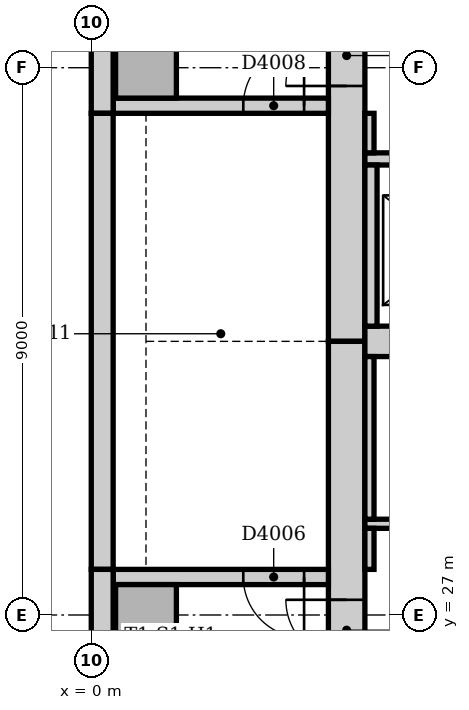
"""IFC4 building model, lengths in metres.
Left out: names, types, materials, properties, quantities, classifications, styles, units other than length and angle.
Written with IfcOpenShell. Run it as: python <this file> out.ifc"""

import sys

from ifc_helpers import new_model, si_unit, direction, frame, frame_2d, origin, origin_2d, place, context, subcontext, project, spatial, rectangle, extrude, element, fill, save


model = new_model("IFC4")
c1 = context("Model", 3, precision=1e-05, world=origin(), true_north=direction((0.0, 1.0)))
c2 = subcontext(c1, "Body", "Model", "MODEL_VIEW")
j1 = project(units=[si_unit("LENGTHUNIT", "METRE"), si_unit("PLANEANGLEUNIT", "RADIAN")], contexts=[c1])
p1 = place(None, origin())
s1 = spatial("IfcSite", under=j1, at=p1, CompositionType="ELEMENT")
p2 = place(p1, origin())
s2 = spatial("IfcBuilding", under=s1, at=p2, CompositionType="ELEMENT")
p3 = place(p2, frame((0.0, 0.0, 108.0)))
s3 = spatial("IfcBuildingStorey", under=s2, at=p3, CompositionType="ELEMENT", Elevation=108.0)
p4 = place(p3, frame((4.2, 42.0, 0.0), z_axis=(0.0, 0.0, 1.0), x_axis=(0.0, -1.0, 0.0)))
e1 = element("IfcWall", 1, at=p4, inside=s3, PredefinedType="SOLIDWALL", context=c2, shape_type="SweptSolid", body=[
    extrude(rectangle(XDim=10.5, YDim=0.6, at=frame_2d((5.25, 0.0))), origin(), (0.0, 0.0, 1.0), 4.0),
])
p5 = place(p4, frame((5.3, 0.0, 0.0)))
e2 = element("IfcOpeningElement", 2, at=p5, cuts=e1, PredefinedType="OPENING", context=c2, shape_type="SweptSolid", body=[
    extrude(rectangle(XDim=1.0, YDim=2.1, at=frame_2d((0.5, 1.05))), frame((0.0, 0.31, 0.0), z_axis=(0.0, -1.0, 0.0), x_axis=(1.0, 0.0, 0.0)), (0.0, 0.0, 1.0), 0.62),
])
p6 = place(p3, frame((4.2, 31.5, 0.0), z_axis=(0.0, 0.0, 1.0), x_axis=(0.0, -1.0, 0.0)))
e3 = element("IfcWall", 3, at=p6, inside=s3, PredefinedType="SOLIDWALL", context=c2, shape_type="SweptSolid", body=[
    extrude(rectangle(XDim=10.5, YDim=0.6, at=frame_2d((5.25, 0.0))), origin(), (0.0, 0.0, 1.0), 4.0),
])
p7 = place(p6, frame((4.25, 0.0, 0.0)))
e4 = element("IfcOpeningElement", 4, at=p7, cuts=e3, PredefinedType="OPENING", context=c2, shape_type="SweptSolid", body=[
    extrude(rectangle(XDim=1.0, YDim=2.1, at=frame_2d((0.5, 1.05))), frame((0.0, 0.31, 0.0), z_axis=(0.0, -1.0, 0.0), x_axis=(1.0, 0.0, 0.0)), (0.0, 0.0, 1.0), 0.62),
])
p8 = place(p3, frame((4.5, 31.5, 0.0), z_axis=(0.0, 0.0, 1.0), x_axis=(1.0, 0.0, 0.0)))
e5 = element("IfcWall", 5, at=p8, inside=s3, PredefinedType="SOLIDWALL", context=c2, shape_type="SweptSolid", body=[
    extrude(rectangle(XDim=18.0, YDim=0.5, at=frame_2d((9.0, 0.0))), origin(), (0.0, 0.0, 1.0), 4.0),
])
p9 = place(p3, frame((3.9, 27.625, 0.0), z_axis=(0.0, 0.0, 1.0), x_axis=(-1.0, 0.0, 0.0)))
e6 = element("IfcWall", 6, at=p9, inside=s3, PredefinedType="SOLIDWALL", context=c2, shape_type="SweptSolid", body=[
    extrude(rectangle(XDim=3.54, YDim=0.25, at=frame_2d((1.77, 0.0))), origin(), (0.0, 0.0, 1.0), 4.0),
])
p10 = place(p9, frame((0.4, 0.0, 0.0)))
e7 = element("IfcOpeningElement", 7, at=p10, cuts=e6, PredefinedType="OPENING", context=c2, shape_type="SweptSolid", body=[
    extrude(rectangle(XDim=1.0, YDim=2.1, at=frame_2d((0.5, 1.05))), frame((0.0, 0.135, 0.0), z_axis=(0.0, -1.0, 0.0), x_axis=(1.0, 0.0, 0.0)), (0.0, 0.0, 1.0), 0.27),
])
p11 = place(p3, frame((0.36, 35.375, 0.0), z_axis=(0.0, 0.0, 1.0), x_axis=(1.0, 0.0, 0.0)))
e8 = element("IfcWall", 8, at=p11, inside=s3, PredefinedType="SOLIDWALL", context=c2, shape_type="SweptSolid", body=[
    extrude(rectangle(XDim=3.54, YDim=0.25, at=frame_2d((1.77, 0.0))), origin(), (0.0, 0.0, 1.0), 4.0),
])
p12 = place(p11, frame((2.14, 0.0, 0.0)))
e9 = element("IfcOpeningElement", 9, at=p12, cuts=e8, PredefinedType="OPENING", context=c2, shape_type="SweptSolid", body=[
    extrude(rectangle(XDim=1.0, YDim=2.1, at=frame_2d((0.5, 1.05))), frame((0.0, 0.135, 0.0), z_axis=(0.0, -1.0, 0.0), x_axis=(1.0, 0.0, 0.0)), (0.0, 0.0, 1.0), 0.27),
])
for number, where, z_axis, x_axis in (
    (10, (0.9, 27.0, 0.0), (0.0, 0.0, 1.0), (1.0, 0.0, 0.0)),
    (11, (0.9, 36.0, 0.0), (0.0, 0.0, 1.0), (1.0, 0.0, 0.0)),
):
    element("IfcColumn", number, at=place(p3, frame(where, z_axis=z_axis, x_axis=x_axis)), inside=s3, PredefinedType="COLUMN", context=c2, shape_type="SweptSolid", body=[
        extrude(rectangle(XDim=1.0, YDim=1.0, at=origin_2d()), origin(), (0.0, 0.0, 1.0), 4.0),
    ])
p13 = place(p3, frame((0.18, 42.0, 0.0), z_axis=(0.0, 0.0, 1.0), x_axis=(0.0, -1.0, 0.0)))
e12 = element("IfcWall", 12, at=p13, inside=s3, PredefinedType="STANDARD", context=c2, shape_type="SweptSolid", body=[
    extrude(rectangle(XDim=6.75, YDim=0.36, at=frame_2d((3.375, 0.0))), origin(), (0.0, 0.0, 1.0), 3.85),
])
p14 = place(p3, frame((0.18, 35.25, 0.0), z_axis=(0.0, 0.0, 1.0), x_axis=(0.0, -1.0, 0.0)))
e13 = element("IfcWall", 13, at=p14, inside=s3, PredefinedType="STANDARD", context=c2, shape_type="SweptSolid", body=[
    extrude(rectangle(XDim=7.5, YDim=0.36, at=frame_2d((3.75, 0.0))), origin(), (0.0, 0.0, 1.0), 3.85),
])
p15 = place(p3, frame((0.18, 27.75, 0.0), z_axis=(0.0, 0.0, 1.0), x_axis=(0.0, -1.0, 0.0)))
e14 = element("IfcWall", 14, at=p15, inside=s3, PredefinedType="STANDARD", context=c2, shape_type="SweptSolid", body=[
    extrude(rectangle(XDim=6.75, YDim=0.36, at=frame_2d((3.375, 0.0))), origin(), (0.0, 0.0, 1.0), 3.85),
])
p16 = place(p3, frame((4.5, 34.5, 0.0), z_axis=(0.0, 0.0, 1.0), x_axis=(1.0, 0.0, 0.0)))
e15 = element("IfcWall", 15, at=p16, inside=s3, PredefinedType="PARTITIONING", context=c2, shape_type="SweptSolid", body=[
    extrude(rectangle(XDim=18.0, YDim=0.2, at=frame_2d((9.0, 0.0))), origin(), (0.0, 0.0, 1.0), 3.85),
])
p17 = place(p16, frame((0.95, 0.0, 0.0)))
e16 = element("IfcOpeningElement", 16, at=p17, cuts=e15, PredefinedType="OPENING", context=c2, shape_type="SweptSolid", body=[
    extrude(rectangle(XDim=1.1, YDim=2.1, at=frame_2d((0.55, 1.05))), frame((0.0, 0.11, 0.0), z_axis=(0.0, -1.0, 0.0), x_axis=(1.0, 0.0, 0.0)), (0.0, 0.0, 1.0), 0.22),
])
p18 = place(p16, frame((3.95, 0.0, 0.0)))
e17 = element("IfcOpeningElement", 17, at=p18, cuts=e15, PredefinedType="OPENING", context=c2, shape_type="SweptSolid", body=[
    extrude(rectangle(XDim=1.1, YDim=2.1, at=frame_2d((0.55, 1.05))), frame((0.0, 0.11, 0.0), z_axis=(0.0, -1.0, 0.0), x_axis=(1.0, 0.0, 0.0)), (0.0, 0.0, 1.0), 0.22),
])
p19 = place(p16, frame((12.95, 0.0, 0.0)))
e18 = element("IfcOpeningElement", 18, at=p19, cuts=e15, PredefinedType="OPENING", context=c2, shape_type="SweptSolid", body=[
    extrude(rectangle(XDim=1.1, YDim=2.1, at=frame_2d((0.55, 1.05))), frame((0.0, 0.11, 0.0), z_axis=(0.0, -1.0, 0.0), x_axis=(1.0, 0.0, 0.0)), (0.0, 0.0, 1.0), 0.22),
])
p20 = place(p16, frame((15.95, 0.0, 0.0)))
e19 = element("IfcOpeningElement", 19, at=p20, cuts=e15, PredefinedType="OPENING", context=c2, shape_type="SweptSolid", body=[
    extrude(rectangle(XDim=1.1, YDim=2.1, at=frame_2d((0.55, 1.05))), frame((0.0, 0.11, 0.0), z_axis=(0.0, -1.0, 0.0), x_axis=(1.0, 0.0, 0.0)), (0.0, 0.0, 1.0), 0.22),
])
p21 = place(p3, frame((4.6, 31.75, 0.0), z_axis=(0.0, 0.0, 1.0), x_axis=(0.0, 1.0, 0.0)))
e20 = element("IfcWall", 20, at=p21, inside=s3, PredefinedType="PARTITIONING", context=c2, shape_type="SweptSolid", body=[
    extrude(rectangle(XDim=2.65, YDim=0.2, at=frame_2d((1.325, 0.0))), origin(), (0.0, 0.0, 1.0), 3.85),
])
p22 = place(p3, frame((4.5, 28.5, 0.0), z_axis=(0.0, 0.0, 1.0), x_axis=(1.0, 0.0, 0.0)))
e21 = element("IfcWall", 21, at=p22, inside=s3, PredefinedType="PARTITIONING", context=c2, shape_type="SweptSolid", body=[
    extrude(rectangle(XDim=18.0, YDim=0.15, at=frame_2d((9.0, 0.0))), origin(), (0.0, 0.0, 1.0), 3.85),
])
p23 = place(p22, frame((1.85, 0.0, 0.0)))
e22 = element("IfcOpeningElement", 22, at=p23, cuts=e21, PredefinedType="OPENING", context=c2, shape_type="SweptSolid", body=[
    extrude(rectangle(XDim=0.9, YDim=2.1, at=frame_2d((0.45, 1.05))), frame((0.0, 0.085, 0.0), z_axis=(0.0, -1.0, 0.0), x_axis=(1.0, 0.0, 0.0)), (0.0, 0.0, 1.0), 0.17),
])
p24 = place(p22, frame((6.3, 0.0, 0.0)))
e23 = element("IfcOpeningElement", 23, at=p24, cuts=e21, PredefinedType="OPENING", context=c2, shape_type="SweptSolid", body=[
    extrude(rectangle(XDim=0.9, YDim=2.1, at=frame_2d((0.45, 1.05))), frame((0.0, 0.085, 0.0), z_axis=(0.0, -1.0, 0.0), x_axis=(1.0, 0.0, 0.0)), (0.0, 0.0, 1.0), 0.17),
])
p25 = place(p22, frame((12.95, 0.0, 0.0)))
e24 = element("IfcOpeningElement", 24, at=p25, cuts=e21, PredefinedType="OPENING", context=c2, shape_type="SweptSolid", body=[
    extrude(rectangle(XDim=0.9, YDim=2.1, at=frame_2d((0.45, 1.05))), frame((0.0, 0.085, 0.0), z_axis=(0.0, -1.0, 0.0), x_axis=(1.0, 0.0, 0.0)), (0.0, 0.0, 1.0), 0.17),
])
p26 = place(p3, frame((4.575, 27.75, 0.0), z_axis=(0.0, 0.0, 1.0), x_axis=(0.0, 1.0, 0.0)))
e25 = element("IfcWall", 25, at=p26, inside=s3, PredefinedType="PARTITIONING", context=c2, shape_type="SweptSolid", body=[
    extrude(rectangle(XDim=0.675, YDim=0.15, at=frame_2d((0.338, 0.0))), origin(), (0.0, 0.0, 1.0), 3.85),
])
p27 = place(p3, frame((4.575, 28.575, 0.0), z_axis=(0.0, 0.0, 1.0), x_axis=(0.0, 1.0, 0.0)))
e26 = element("IfcWall", 26, at=p27, inside=s3, PredefinedType="PARTITIONING", context=c2, shape_type="SweptSolid", body=[
    extrude(rectangle(XDim=2.675, YDim=0.15, at=frame_2d((1.337, 0.0))), origin(), (0.0, 0.0, 1.0), 3.85),
])
p28 = place(p3, frame((4.575, 34.6, 0.0), z_axis=(0.0, 0.0, 1.0), x_axis=(0.0, 1.0, 0.0)))
e27 = element("IfcWall", 27, at=p28, inside=s3, PredefinedType="PARTITIONING", context=c2, shape_type="SweptSolid", body=[
    extrude(rectangle(XDim=0.65, YDim=0.15, at=frame_2d((0.325, 0.0))), origin(), (0.0, 0.0, 1.0), 3.85),
])
p29 = place(p7, frame((1.0, 0.0, 0.0), z_axis=(0.0, 0.0, 1.0), x_axis=(-1.0, 0.0, 0.0)))
e28 = element("IfcDoor", 28, at=p29, inside=s3, OperationType="SINGLE_SWING_RIGHT", PredefinedType="DOOR", context=c2, shape_type="SweptSolid", body=[
    extrude(rectangle(XDim=1.0, YDim=2.1, at=frame_2d((0.5, 1.05))), frame((0.0, 0.025, 0.0), z_axis=(0.0, -1.0, 0.0), x_axis=(1.0, 0.0, 0.0)), (0.0, 0.0, 1.0), 0.05),
])
fill(e4, e28)
p30 = place(p10, origin())
e29 = element("IfcDoor", 29, at=p30, inside=s3, OperationType="SINGLE_SWING_LEFT", PredefinedType="DOOR", context=c2, shape_type="SweptSolid", body=[
    extrude(rectangle(XDim=1.0, YDim=2.1, at=frame_2d((0.5, 1.05))), frame((0.0, 0.025, 0.0), z_axis=(0.0, -1.0, 0.0), x_axis=(1.0, 0.0, 0.0)), (0.0, 0.0, 1.0), 0.05),
])
fill(e7, e29)
p31 = place(p5, frame((1.0, 0.0, 0.0), z_axis=(0.0, 0.0, 1.0), x_axis=(-1.0, 0.0, 0.0)))
e30 = element("IfcDoor", 30, at=p31, inside=s3, OperationType="SINGLE_SWING_LEFT", PredefinedType="DOOR", context=c2, shape_type="SweptSolid", body=[
    extrude(rectangle(XDim=1.0, YDim=2.1, at=frame_2d((0.5, 1.05))), frame((0.0, 0.025, 0.0), z_axis=(0.0, -1.0, 0.0), x_axis=(1.0, 0.0, 0.0)), (0.0, 0.0, 1.0), 0.05),
])
fill(e2, e30)
p32 = place(p12, origin())
e31 = element("IfcDoor", 31, at=p32, inside=s3, OperationType="SINGLE_SWING_RIGHT", PredefinedType="DOOR", context=c2, shape_type="SweptSolid", body=[
    extrude(rectangle(XDim=1.0, YDim=2.1, at=frame_2d((0.5, 1.05))), frame((0.0, 0.025, 0.0), z_axis=(0.0, -1.0, 0.0), x_axis=(1.0, 0.0, 0.0)), (0.0, 0.0, 1.0), 0.05),
])
fill(e9, e31)
save(model, sys.argv[1])
